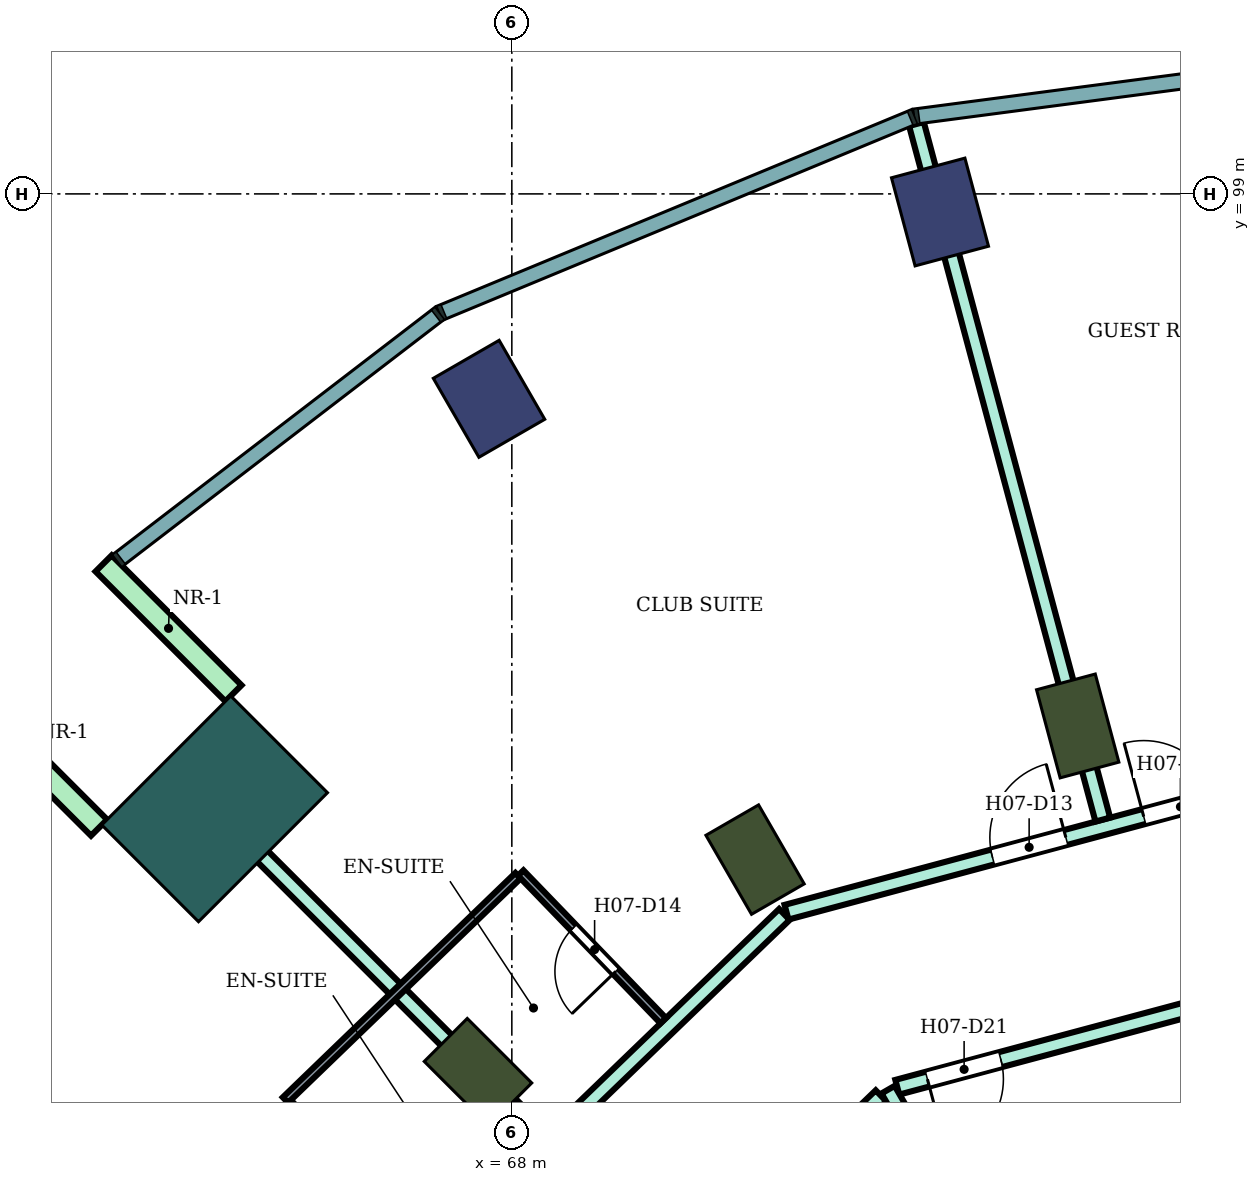
"""IFC4 building model, lengths in metres.
Left out: names, types, materials, properties, quantities, classifications, styles, units other than length and angle.
Written with IfcOpenShell. Run it as: python <this file> out.ifc"""

import sys

from ifc_helpers import new_model, si_unit, direction, frame, frame_2d, origin, origin_2d, place, context, subcontext, project, spatial, rectangle, extrude, element, fill, save


model = new_model("IFC4")
c1 = context("Model", 3, precision=1e-05, world=origin(), true_north=direction((0.0, 1.0)))
c2 = subcontext(c1, "Body", "Model", "MODEL_VIEW")
j1 = project(units=[si_unit("LENGTHUNIT", "METRE"), si_unit("PLANEANGLEUNIT", "RADIAN")], contexts=[c1])
p1 = place(None, origin())
s1 = spatial("IfcSite", under=j1, at=p1, CompositionType="ELEMENT")
p2 = place(p1, origin())
s2 = spatial("IfcBuilding", under=s1, at=p2, CompositionType="ELEMENT")
p3 = place(p2, frame((0.0, 0.0, 105.2)))
s3 = spatial("IfcBuildingStorey", under=s2, at=p3, CompositionType="ELEMENT", Elevation=105.2)
for number, where, z_axis, x_axis in (
    (1, (73.633, 98.762, 0.0), (0.0, 0.0, 1.0), (-0.259, 0.966, 0.0)),
    (2, (67.7, 96.304, 0.0), (0.0, 0.0, 1.0), (-0.5, 0.866, 0.0)),
):
    element("IfcColumn", number, at=place(p3, frame(where, z_axis=z_axis, x_axis=x_axis)), inside=s3, PredefinedType="COLUMN", context=c2, shape_type="SweptSolid", body=[
        extrude(rectangle(XDim=1.2, YDim=1.0, at=origin_2d()), origin(), (0.0, 0.0, 1.0), 3.8),
    ])
for number, where, z_axis, x_axis in (
    (3, (75.445, 92.0, 0.0), (0.0, 0.0, 1.0), (-0.259, 0.966, 0.0)),
    (4, (71.2, 90.242, 0.0), (0.0, 0.0, 1.0), (-0.5, 0.866, 0.0)),
    (5, (67.555, 87.445, 0.0), (0.0, 0.0, 1.0), (-0.707, 0.707, 0.0)),
):
    element("IfcColumn", number, at=place(p3, frame(where, z_axis=z_axis, x_axis=x_axis)), inside=s3, PredefinedType="COLUMN", context=c2, shape_type="SweptSolid", body=[
        extrude(rectangle(XDim=1.2, YDim=0.8, at=origin_2d()), origin(), (0.0, 0.0, 1.0), 3.8),
    ])
p4 = place(p3, frame((64.09, 90.91, 0.0), z_axis=(0.0, 0.0, 1.0), x_axis=(-0.707106781187, 0.707106781187, 0.0)))
e6 = element("IfcColumn", 6, at=p4, inside=s3, PredefinedType="COLUMN", context=c2, shape_type="SweptSolid", body=[
    extrude(rectangle(XDim=1.8, YDim=2.4, at=origin_2d()), origin(), (0.0, 0.0, 1.0), 3.8),
])
for number, where, z_axis, x_axis in (
    (7, (64.338, 92.43, 0.0), (0.0, 0.0, 1.0), (-0.707, 0.707, 0.0)),
    (8, (62.57, 90.662, 0.0), (0.0, 0.0, 1.0), (-0.707, 0.707, 0.0)),
):
    element("IfcWall", number, at=place(p3, frame(where, z_axis=z_axis, x_axis=x_axis)), inside=s3, PredefinedType="NOTDEFINED", context=c2, shape_type="SweptSolid", body=[
        extrude(rectangle(XDim=2.416, YDim=0.3, at=frame_2d((1.208, 0.0))), origin(), (0.0, 0.0, 1.0), 3.8),
    ])
p5 = place(p3, frame((63.598, 91.407, 0.0), z_axis=(0.0, 0.0, 1.0), x_axis=(0.706981183365, -0.707232356703, 0.0)))
e9 = element("IfcWall", 9, at=p5, inside=s3, PredefinedType="PARTITIONING", context=c2, shape_type="SweptSolid", body=[
    extrude(rectangle(XDim=6.804, YDim=0.2, at=frame_2d((3.402, 0.0))), origin(), (0.0, 0.0, 1.0), 3.35),
])
p6 = place(p3, frame((66.795, 84.9, 0.0), z_axis=(0.0, 0.0, 1.0), x_axis=(0.719793233107, 0.694188520197, 0.0)))
e10 = element("IfcWall", 10, at=p6, inside=s3, PredefinedType="PARTITIONING", context=c2, shape_type="SweptSolid", body=[
    extrude(rectangle(XDim=6.656, YDim=0.2, at=frame_2d((3.328, 0.0))), origin(), (0.0, 0.0, 1.0), 3.35),
])
p7 = place(p3, frame((68.987, 83.4, 0.0), z_axis=(0.0, 0.0, 1.0), x_axis=(0.719547721855, 0.694442996922, 0.0)))
e11 = element("IfcWall", 11, at=p7, inside=s3, PredefinedType="PARTITIONING", context=c2, shape_type="SweptSolid", body=[
    extrude(rectangle(XDim=5.378, YDim=0.2, at=frame_2d((2.689, 0.0))), origin(), (0.0, 0.0, 1.0), 3.35),
])
p8 = place(p7, frame((2.294, 0.0, 0.0)))
e12 = element("IfcOpeningElement", 12, at=p8, cuts=e11, PredefinedType="OPENING", context=c2, shape_type="SweptSolid", body=[
    extrude(rectangle(XDim=0.9, YDim=2.1, at=frame_2d((0.45, 1.05))), frame((0.0, 0.11, 0.0), z_axis=(0.0, -1.0, 0.0), x_axis=(1.0, 0.0, 0.0)), (0.0, 0.0, 1.0), 0.22),
])
p9 = place(p3, frame((71.614, 89.55, 0.0), z_axis=(0.0, 0.0, 1.0), x_axis=(0.96597505802, 0.258635239832, 0.0)))
e13 = element("IfcWall", 13, at=p9, inside=s3, PredefinedType="PARTITIONING", context=c2, shape_type="SweptSolid", body=[
    extrude(rectangle(XDim=8.592, YDim=0.2, at=frame_2d((4.296, 0.0))), origin(), (0.0, 0.0, 1.0), 3.35),
])
p10 = place(p9, frame((4.865, 0.0, 0.0)))
e14 = element("IfcOpeningElement", 14, at=p10, cuts=e13, PredefinedType="OPENING", context=c2, shape_type="SweptSolid", body=[
    extrude(rectangle(XDim=1.0, YDim=2.1, at=frame_2d((0.5, 1.05))), frame((0.0, 0.11, 0.0), z_axis=(0.0, -1.0, 0.0), x_axis=(1.0, 0.0, 0.0)), (0.0, 0.0, 1.0), 0.22),
])
p11 = place(p9, frame((2.804, 0.0, 0.0)))
e15 = element("IfcOpeningElement", 15, at=p11, cuts=e13, PredefinedType="OPENING", context=c2, shape_type="SweptSolid", body=[
    extrude(rectangle(XDim=1.0, YDim=2.1, at=frame_2d((0.5, 1.05))), frame((0.0, 0.11, 0.0), z_axis=(0.0, -1.0, 0.0), x_axis=(1.0, 0.0, 0.0)), (0.0, 0.0, 1.0), 0.22),
])
p12 = place(p3, frame((73.071, 87.247, 0.0), z_axis=(0.0, 0.0, 1.0), x_axis=(0.965931651205, 0.258797305243, 0.0)))
e16 = element("IfcWall", 16, at=p12, inside=s3, PredefinedType="PARTITIONING", context=c2, shape_type="SweptSolid", body=[
    extrude(rectangle(XDim=7.043, YDim=0.2, at=frame_2d((3.521, 0.0))), origin(), (0.0, 0.0, 1.0), 3.35),
])
p13 = place(p12, frame((0.41, 0.0, 0.0)))
e17 = element("IfcOpeningElement", 17, at=p13, cuts=e16, PredefinedType="OPENING", context=c2, shape_type="SweptSolid", body=[
    extrude(rectangle(XDim=1.0, YDim=2.1, at=frame_2d((0.5, 1.05))), frame((0.0, 0.11, 0.0), z_axis=(0.0, -1.0, 0.0), x_axis=(1.0, 0.0, 0.0)), (0.0, 0.0, 1.0), 0.22),
])
p14 = place(p3, frame((72.95, 87.215, 0.0), z_axis=(0.0, 0.0, 1.0), x_axis=(0.499881928498, -0.866093561667, 0.0)))
e18 = element("IfcWall", 18, at=p14, inside=s3, PredefinedType="PARTITIONING", context=c2, shape_type="SweptSolid", body=[
    extrude(rectangle(XDim=6.405, YDim=0.2, at=frame_2d((3.203, 0.0))), origin(), (0.0, 0.0, 1.0), 3.35),
])
p15 = place(p3, frame((73.323, 99.919, 0.0), z_axis=(0.0, 0.0, 1.0), x_axis=(0.258818956582, -0.965925850008, 0.0)))
e19 = element("IfcWall", 19, at=p15, inside=s3, PredefinedType="PARTITIONING", context=c2, shape_type="SweptSolid", body=[
    extrude(rectangle(XDim=9.473, YDim=0.2, at=frame_2d((4.737, 0.0))), origin(), (0.0, 0.0, 1.0), 3.35),
])
p16 = place(p3, frame((65.057, 87.043, 0.0), z_axis=(0.0, 0.0, 1.0), x_axis=(0.694324808789, -0.719661767708, 0.0)))
e20 = element("IfcWall", 20, at=p16, inside=s3, PredefinedType="PARTITIONING", context=c2, shape_type="SweptSolid", body=[
    extrude(rectangle(XDim=2.65, YDim=0.1, at=frame_2d((1.325, 0.0))), origin(), (0.0, 0.0, 1.0), 3.35),
])
p17 = place(p16, frame((0.8, 0.0, 0.0)))
e21 = element("IfcOpeningElement", 21, at=p17, cuts=e20, PredefinedType="OPENING", context=c2, shape_type="SweptSolid", body=[
    extrude(rectangle(XDim=0.8, YDim=2.1, at=frame_2d((0.4, 1.05))), frame((0.0, 0.06, 0.0), z_axis=(0.0, -1.0, 0.0), x_axis=(1.0, 0.0, 0.0)), (0.0, 0.0, 1.0), 0.12),
])
p18 = place(p3, frame((65.022, 87.079, 0.0), z_axis=(0.0, 0.0, 1.0), x_axis=(0.719684404795, 0.694301344875, 0.0)))
e22 = element("IfcWall", 22, at=p18, inside=s3, PredefinedType="PARTITIONING", context=c2, shape_type="SweptSolid", body=[
    extrude(rectangle(XDim=4.251, YDim=0.1, at=frame_2d((2.125, 0.0))), origin(), (0.0, 0.0, 1.0), 3.35),
])
p19 = place(p3, frame((68.117, 90.066, 0.0), z_axis=(0.0, 0.0, 1.0), x_axis=(0.694379853631, -0.719608656751, 0.0)))
e23 = element("IfcWall", 23, at=p19, inside=s3, PredefinedType="PARTITIONING", context=c2, shape_type="SweptSolid", body=[
    extrude(rectangle(XDim=2.7, YDim=0.1, at=frame_2d((1.35, 0.0))), origin(), (0.0, 0.0, 1.0), 3.35),
])
p20 = place(p19, frame((1.0, 0.0, 0.0)))
e24 = element("IfcOpeningElement", 24, at=p20, cuts=e23, PredefinedType="OPENING", context=c2, shape_type="SweptSolid", body=[
    extrude(rectangle(XDim=0.8, YDim=2.1, at=frame_2d((0.4, 1.05))), frame((0.0, 0.06, 0.0), z_axis=(0.0, -1.0, 0.0), x_axis=(1.0, 0.0, 0.0)), (0.0, 0.0, 1.0), 0.12),
])
p21 = place(p10, origin())
e25 = element("IfcDoor", 25, at=p21, inside=s3, OperationType="SINGLE_SWING_LEFT", PredefinedType="DOOR", context=c2, shape_type="SweptSolid", body=[
    extrude(rectangle(XDim=1.0, YDim=2.1, at=frame_2d((0.5, 1.05))), frame((0.0, 0.025, 0.0), z_axis=(0.0, -1.0, 0.0), x_axis=(1.0, 0.0, 0.0)), (0.0, 0.0, 1.0), 0.05),
])
fill(e14, e25)
p22 = place(p11, origin())
e26 = element("IfcDoor", 26, at=p22, inside=s3, OperationType="SINGLE_SWING_RIGHT", PredefinedType="DOOR", context=c2, shape_type="SweptSolid", body=[
    extrude(rectangle(XDim=1.0, YDim=2.1, at=frame_2d((0.5, 1.05))), frame((0.0, 0.025, 0.0), z_axis=(0.0, -1.0, 0.0), x_axis=(1.0, 0.0, 0.0)), (0.0, 0.0, 1.0), 0.05),
])
fill(e15, e26)
p23 = place(p20, frame((0.8, 0.0, 0.0), z_axis=(0.0, 0.0, 1.0), x_axis=(-1.0, 0.0, 0.0)))
e27 = element("IfcDoor", 27, at=p23, inside=s3, OperationType="SINGLE_SWING_LEFT", PredefinedType="DOOR", context=c2, shape_type="SweptSolid", body=[
    extrude(rectangle(XDim=0.8, YDim=2.1, at=frame_2d((0.4, 1.05))), frame((0.0, 0.025, 0.0), z_axis=(0.0, -1.0, 0.0), x_axis=(1.0, 0.0, 0.0)), (0.0, 0.0, 1.0), 0.05),
])
fill(e24, e27)
p24 = place(p13, frame((1.0, 0.0, 0.0), z_axis=(0.0, 0.0, 1.0), x_axis=(-1.0, 0.0, 0.0)))
e28 = element("IfcDoor", 28, at=p24, inside=s3, OperationType="SINGLE_SWING_RIGHT", PredefinedType="DOOR", context=c2, shape_type="SweptSolid", body=[
    extrude(rectangle(XDim=1.0, YDim=2.1, at=frame_2d((0.5, 1.05))), frame((0.0, 0.025, 0.0), z_axis=(0.0, -1.0, 0.0), x_axis=(1.0, 0.0, 0.0)), (0.0, 0.0, 1.0), 0.05),
])
fill(e17, e28)
save(model, sys.argv[1])
